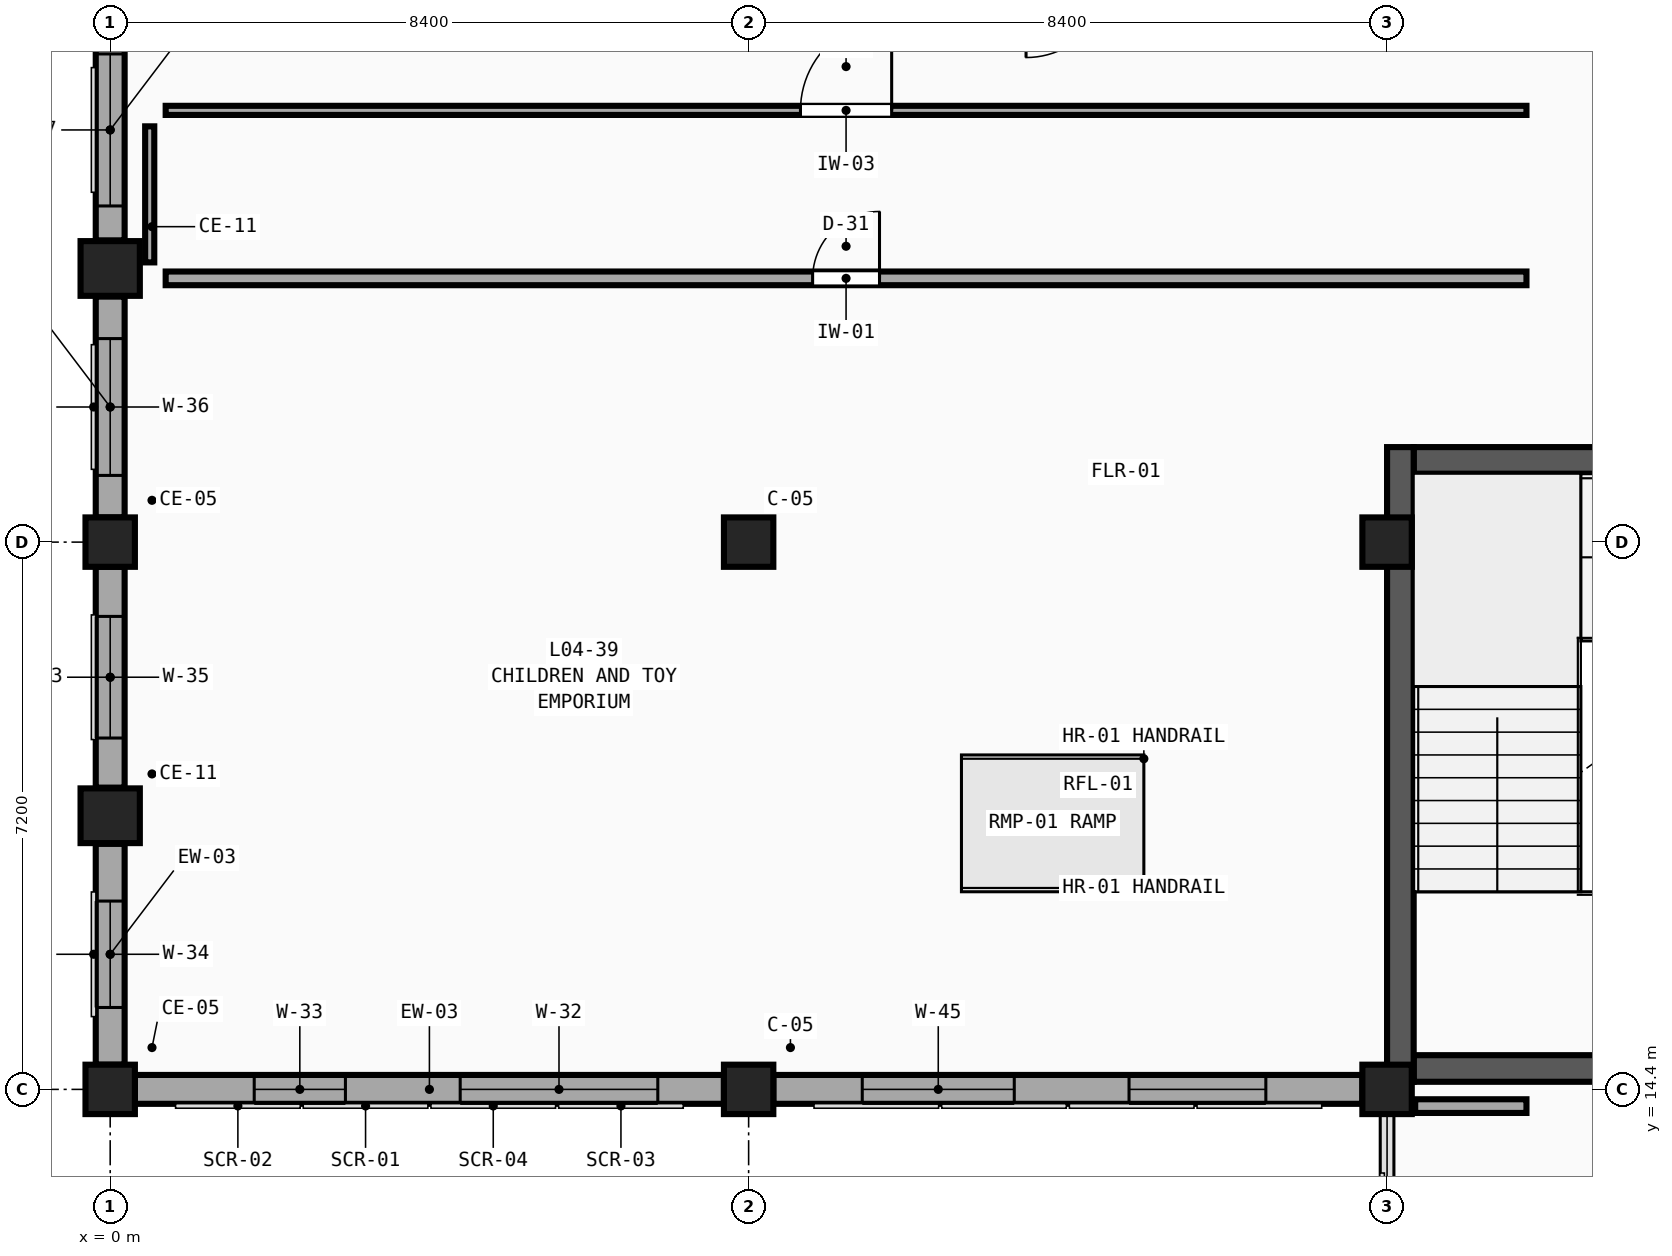
"""IFC4 building model, lengths in metres.
Left out: names, types, materials, properties, quantities, classifications, styles, units other than length and angle.
Written with IfcOpenShell. Run it as: python <this file> out.ifc"""

import sys

from ifc_helpers import new_model, si_unit, direction, frame, frame_2d, origin, origin_2d, place, context, subcontext, project, spatial, rectangle, extrude, element, fill, save


model = new_model("IFC4")
c1 = context("Model", 3, precision=1e-05, world=origin(), true_north=direction((0.0, 1.0)))
c2 = subcontext(c1, "Body", "Model", "MODEL_VIEW")
j1 = project(units=[si_unit("LENGTHUNIT", "METRE"), si_unit("PLANEANGLEUNIT", "RADIAN")], contexts=[c1])
p1 = place(None, origin())
s1 = spatial("IfcSite", under=j1, at=p1, CompositionType="ELEMENT")
p2 = place(p1, origin())
s2 = spatial("IfcBuilding", under=s1, at=p2, CompositionType="ELEMENT")
p3 = place(p2, frame((0.0, 0.0, 18.9)))
s3 = spatial("IfcBuildingStorey", under=s2, at=p3, CompositionType="ELEMENT", Elevation=18.9)
for number, where, z_axis, x_axis in (
    (1, (0.0, 14.4, 0.0), (0.0, 0.0, 1.0), (1.0, 0.0, 0.0)),
    (2, (0.0, 21.6, 0.0), (0.0, 0.0, 1.0), (1.0, 0.0, 0.0)),
    (3, (8.4, 14.4, 0.0), (0.0, 0.0, 1.0), (1.0, 0.0, 0.0)),
    (4, (8.4, 21.6, 0.0), (0.0, 0.0, 1.0), (1.0, 0.0, 0.0)),
    (5, (16.8, 14.4, 0.0), (0.0, 0.0, 1.0), (1.0, 0.0, 0.0)),
    (6, (16.8, 21.6, 0.0), (0.0, 0.0, 1.0), (1.0, 0.0, 0.0)),
):
    element("IfcColumn", number, at=place(p3, frame(where, z_axis=z_axis, x_axis=x_axis)), inside=s3, PredefinedType="COLUMN", context=c2, shape_type="SweptSolid", body=[
        extrude(rectangle(XDim=0.65, YDim=0.65, at=origin_2d()), origin(), (0.0, 0.0, 1.0), 4.5),
    ])
for number, where, z_axis, x_axis in (
    (7, (0.0, 18.0, 0.0), (0.0, 0.0, 1.0), (1.0, 0.0, 0.0)),
    (8, (0.0, 25.2, 0.0), (0.0, 0.0, 1.0), (1.0, 0.0, 0.0)),
):
    element("IfcColumn", number, at=place(p3, frame(where, z_axis=z_axis, x_axis=x_axis)), inside=s3, PredefinedType="PILASTER", context=c2, shape_type="SweptSolid", body=[
        extrude(rectangle(XDim=0.78, YDim=0.72, at=origin_2d()), origin(), (0.0, 0.0, 1.0), 4.5),
    ])
p4 = place(p3, frame((8.075, 14.4, 0.0), z_axis=(0.0, 0.0, 1.0), x_axis=(-1.0, 0.0, 0.0)))
e9 = element("IfcWall", 9, at=p4, inside=s3, PredefinedType="SOLIDWALL", context=c2, shape_type="SweptSolid", body=[
    extrude(rectangle(XDim=7.75, YDim=0.38, at=frame_2d((3.875, 0.0))), origin(), (0.0, 0.0, 1.0), 3.63),
])
p5 = place(p4, frame((0.87, 0.0, 0.75)))
e10 = element("IfcOpeningElement", 10, at=p5, cuts=e9, PredefinedType="OPENING", context=c2, shape_type="SweptSolid", body=[
    extrude(rectangle(XDim=2.6, YDim=2.44, at=frame_2d((1.3, 1.22))), frame((0.0, 0.21, 0.0), z_axis=(0.0, -1.0, 0.0), x_axis=(1.0, 0.0, 0.0)), (0.0, 0.0, 1.0), 0.42),
])
p6 = place(p4, frame((4.98, 0.0, 0.75)))
e11 = element("IfcOpeningElement", 11, at=p6, cuts=e9, PredefinedType="OPENING", context=c2, shape_type="SweptSolid", body=[
    extrude(rectangle(XDim=1.2, YDim=2.62, at=frame_2d((0.6, 1.31))), frame((0.0, 0.21, 0.0), z_axis=(0.0, -1.0, 0.0), x_axis=(1.0, 0.0, 0.0)), (0.0, 0.0, 1.0), 0.42),
])
p7 = place(p3, frame((0.0, 14.725, 0.0), z_axis=(0.0, 0.0, 1.0), x_axis=(0.0, 1.0, 0.0)))
e12 = element("IfcWall", 12, at=p7, inside=s3, PredefinedType="SOLIDWALL", context=c2, shape_type="SweptSolid", body=[
    extrude(rectangle(XDim=2.905, YDim=0.38, at=frame_2d((1.452, 0.0))), origin(), (0.0, 0.0, 1.0), 3.63),
])
p8 = place(p7, frame((0.752, 0.0, 0.75)))
e13 = element("IfcOpeningElement", 13, at=p8, cuts=e12, PredefinedType="OPENING", context=c2, shape_type="SweptSolid", body=[
    extrude(rectangle(XDim=1.4, YDim=2.62, at=frame_2d((0.7, 1.31))), frame((0.0, 0.21, 0.0), z_axis=(0.0, -1.0, 0.0), x_axis=(1.0, 0.0, 0.0)), (0.0, 0.0, 1.0), 0.42),
])
p9 = place(p3, frame((0.0, 18.37, 0.0), z_axis=(0.0, 0.0, 1.0), x_axis=(0.0, 1.0, 0.0)))
e14 = element("IfcWall", 14, at=p9, inside=s3, PredefinedType="SOLIDWALL", context=c2, shape_type="SweptSolid", body=[
    extrude(rectangle(XDim=2.905, YDim=0.38, at=frame_2d((1.452, 0.0))), origin(), (0.0, 0.0, 1.0), 3.63),
])
p10 = place(p9, frame((0.653, 0.0, 0.75)))
e15 = element("IfcOpeningElement", 15, at=p10, cuts=e14, PredefinedType="OPENING", context=c2, shape_type="SweptSolid", body=[
    extrude(rectangle(XDim=1.6, YDim=2.62, at=frame_2d((0.8, 1.31))), frame((0.0, 0.21, 0.0), z_axis=(0.0, -1.0, 0.0), x_axis=(1.0, 0.0, 0.0)), (0.0, 0.0, 1.0), 0.42),
])
p11 = place(p3, frame((0.0, 21.925, 0.0), z_axis=(0.0, 0.0, 1.0), x_axis=(0.0, 1.0, 0.0)))
e16 = element("IfcWall", 16, at=p11, inside=s3, PredefinedType="SOLIDWALL", context=c2, shape_type="SweptSolid", body=[
    extrude(rectangle(XDim=2.905, YDim=0.38, at=frame_2d((1.453, 0.0))), origin(), (0.0, 0.0, 1.0), 3.63),
])
p12 = place(p11, frame((0.552, 0.0, 0.75)))
e17 = element("IfcOpeningElement", 17, at=p12, cuts=e16, PredefinedType="OPENING", context=c2, shape_type="SweptSolid", body=[
    extrude(rectangle(XDim=1.8, YDim=2.62, at=frame_2d((0.9, 1.31))), frame((0.0, 0.21, 0.0), z_axis=(0.0, -1.0, 0.0), x_axis=(1.0, 0.0, 0.0)), (0.0, 0.0, 1.0), 0.42),
])
p13 = place(p3, frame((0.0, 25.57, 0.0), z_axis=(0.0, 0.0, 1.0), x_axis=(0.0, 1.0, 0.0)))
e18 = element("IfcWall", 18, at=p13, inside=s3, PredefinedType="SOLIDWALL", context=c2, shape_type="SweptSolid", body=[
    extrude(rectangle(XDim=2.905, YDim=0.38, at=frame_2d((1.453, 0.0))), origin(), (0.0, 0.0, 1.0), 3.63),
])
p14 = place(p13, frame((0.452, 0.0, 0.75)))
e19 = element("IfcOpeningElement", 19, at=p14, cuts=e18, PredefinedType="OPENING", context=c2, shape_type="SweptSolid", body=[
    extrude(rectangle(XDim=2.0, YDim=2.62, at=frame_2d((1.0, 1.31))), frame((0.0, 0.21, 0.0), z_axis=(0.0, -1.0, 0.0), x_axis=(1.0, 0.0, 0.0)), (0.0, 0.0, 1.0), 0.42),
])
p15 = place(p3, frame((16.475, 14.4, 0.0), z_axis=(0.0, 0.0, 1.0), x_axis=(-1.0, 0.0, 0.0)))
e20 = element("IfcWall", 20, at=p15, inside=s3, PredefinedType="SOLIDWALL", context=c2, shape_type="SweptSolid", body=[
    extrude(rectangle(XDim=7.75, YDim=0.38, at=frame_2d((3.875, 0.0))), origin(), (0.0, 0.0, 1.0), 3.63),
])
p16 = place(p15, frame((1.27, 0.0, 0.75)))
e21 = element("IfcOpeningElement", 21, at=p16, cuts=e20, PredefinedType="OPENING", context=c2, shape_type="SweptSolid", body=[
    extrude(rectangle(XDim=1.8, YDim=2.73, at=frame_2d((0.9, 1.365))), frame((0.0, 0.21, 0.0), z_axis=(0.0, -1.0, 0.0), x_axis=(1.0, 0.0, 0.0)), (0.0, 0.0, 1.0), 0.42),
])
p17 = place(p15, frame((4.58, 0.0, 0.75)))
e22 = element("IfcOpeningElement", 22, at=p17, cuts=e20, PredefinedType="OPENING", context=c2, shape_type="SweptSolid", body=[
    extrude(rectangle(XDim=2.0, YDim=2.73, at=frame_2d((1.0, 1.365))), frame((0.0, 0.21, 0.0), z_axis=(0.0, -1.0, 0.0), x_axis=(1.0, 0.0, 0.0)), (0.0, 0.0, 1.0), 0.42),
])
p18 = place(p3, frame((24.85, 14.675, 0.0), z_axis=(0.0, 0.0, 1.0), x_axis=(-1.0, 0.0, 0.0)))
e23 = element("IfcWall", 23, at=p18, inside=s3, PredefinedType="SHEAR", context=c2, shape_type="SweptSolid", body=[
    extrude(rectangle(XDim=7.7, YDim=0.35, at=frame_2d((3.85, 0.0))), origin(), (0.0, 0.0, 1.0), 4.5),
])
p19 = place(p18, frame((3.3, 0.0, 0.0)))
e24 = element("IfcOpeningElement", 24, at=p19, cuts=e23, PredefinedType="OPENING", context=c2, shape_type="SweptSolid", body=[
    extrude(rectangle(XDim=1.1, YDim=2.2, at=frame_2d((0.55, 1.1))), frame((0.0, 0.195, 0.0), z_axis=(0.0, -1.0, 0.0), x_axis=(1.0, 0.0, 0.0)), (0.0, 0.0, 1.0), 0.39),
])
p20 = place(p3, frame((17.15, 22.675, 0.0), z_axis=(0.0, 0.0, 1.0), x_axis=(1.0, 0.0, 0.0)))
e25 = element("IfcWall", 25, at=p20, inside=s3, PredefinedType="SHEAR", context=c2, shape_type="SweptSolid", body=[
    extrude(rectangle(XDim=7.7, YDim=0.35, at=frame_2d((3.85, 0.0))), origin(), (0.0, 0.0, 1.0), 4.5),
])
p21 = place(p3, frame((16.975, 22.85, 0.0), z_axis=(0.0, 0.0, 1.0), x_axis=(0.0, -1.0, 0.0)))
e26 = element("IfcWall", 26, at=p21, inside=s3, PredefinedType="SHEAR", context=c2, shape_type="SweptSolid", body=[
    extrude(rectangle(XDim=8.35, YDim=0.35, at=frame_2d((4.175, 0.0))), origin(), (0.0, 0.0, 1.0), 4.5),
])
p22 = place(p3, frame((0.73, 25.07, 0.0), z_axis=(0.0, 0.0, 1.0), x_axis=(1.0, 0.0, 0.0)))
e27 = element("IfcWall", 27, at=p22, inside=s3, PredefinedType="PARTITIONING", context=c2, shape_type="SweptSolid", body=[
    extrude(rectangle(XDim=17.904, YDim=0.18, at=frame_2d((8.952, 0.0))), origin(), (0.0, 0.0, 1.0), 4.18),
])
p23 = place(p22, frame((8.512, 0.0, 0.0)))
e28 = element("IfcOpeningElement", 28, at=p23, cuts=e27, PredefinedType="OPENING", context=c2, shape_type="SweptSolid", body=[
    extrude(rectangle(XDim=0.88, YDim=2.45, at=frame_2d((0.44, 1.225))), frame((0.0, 0.11, 0.0), z_axis=(0.0, -1.0, 0.0), x_axis=(1.0, 0.0, 0.0)), (0.0, 0.0, 1.0), 0.22),
])
p24 = place(p3, frame((0.73, 27.28, 0.0), z_axis=(0.0, 0.0, 1.0), x_axis=(1.0, 0.0, 0.0)))
e29 = element("IfcWall", 29, at=p24, inside=s3, PredefinedType="PARTITIONING", context=c2, shape_type="SweptSolid", body=[
    extrude(rectangle(XDim=17.904, YDim=0.12, at=frame_2d((8.952, 0.0))), origin(), (0.0, 0.0, 1.0), 4.18),
])
p25 = place(p24, frame((8.352, 0.0, 0.0)))
e30 = element("IfcOpeningElement", 30, at=p25, cuts=e29, PredefinedType="OPENING", context=c2, shape_type="SweptSolid", body=[
    extrude(rectangle(XDim=1.2, YDim=2.45, at=frame_2d((0.6, 1.225))), frame((0.0, 0.08, 0.0), z_axis=(0.0, -1.0, 0.0), x_axis=(1.0, 0.0, 0.0)), (0.0, 0.0, 1.0), 0.16),
])
p26 = place(p3, frame((0.52, 25.28, 0.0), z_axis=(0.0, 0.0, 1.0), x_axis=(0.0, 1.0, 0.0)))
e31 = element("IfcWall", 31, at=p26, inside=s3, PredefinedType="PARTITIONING", context=c2, shape_type="SweptSolid", body=[
    extrude(rectangle(XDim=1.79, YDim=0.12, at=frame_2d((0.895, 0.0))), origin(), (0.0, 0.0, 1.0), 3.63),
])
p27 = place(p3, frame((17.17, 14.18, 0.0), z_axis=(0.0, 0.0, 1.0), x_axis=(1.0, 0.0, 0.0)))
e32 = element("IfcWall", 32, at=p27, inside=s3, PredefinedType="PARTITIONING", context=c2, shape_type="SweptSolid", body=[
    extrude(rectangle(XDim=1.464, YDim=0.18, at=frame_2d((0.732, 0.0))), origin(), (0.0, 0.0, 1.0), 3.73),
])
p28 = place(p5, origin())
e33 = element("IfcWindow", 33, at=p28, inside=s3, PartitioningType="TRIPLE_PANEL_VERTICAL", PredefinedType="WINDOW", context=c2, shape_type="SweptSolid", body=[
    extrude(rectangle(XDim=2.6, YDim=2.44, at=frame_2d((1.3, 1.22))), frame((0.0, 0.03, 0.0), z_axis=(0.0, -1.0, 0.0), x_axis=(1.0, 0.0, 0.0)), (0.0, 0.0, 1.0), 0.06),
])
fill(e10, e33)
p29 = place(p6, origin())
e34 = element("IfcWindow", 34, at=p29, inside=s3, PartitioningType="SINGLE_PANEL", PredefinedType="WINDOW", context=c2, shape_type="SweptSolid", body=[
    extrude(rectangle(XDim=1.2, YDim=2.62, at=frame_2d((0.6, 1.31))), frame((0.0, 0.03, 0.0), z_axis=(0.0, -1.0, 0.0), x_axis=(1.0, 0.0, 0.0)), (0.0, 0.0, 1.0), 0.06),
])
fill(e11, e34)
p30 = place(p8, origin())
e35 = element("IfcWindow", 35, at=p30, inside=s3, PartitioningType="DOUBLE_PANEL_VERTICAL", PredefinedType="WINDOW", context=c2, shape_type="SweptSolid", body=[
    extrude(rectangle(XDim=1.4, YDim=2.62, at=frame_2d((0.7, 1.31))), frame((0.0, 0.03, 0.0), z_axis=(0.0, -1.0, 0.0), x_axis=(1.0, 0.0, 0.0)), (0.0, 0.0, 1.0), 0.06),
])
fill(e13, e35)
p31 = place(p10, origin())
e36 = element("IfcWindow", 36, at=p31, inside=s3, PartitioningType="DOUBLE_PANEL_VERTICAL", PredefinedType="WINDOW", context=c2, shape_type="SweptSolid", body=[
    extrude(rectangle(XDim=1.6, YDim=2.62, at=frame_2d((0.8, 1.31))), frame((0.0, 0.03, 0.0), z_axis=(0.0, -1.0, 0.0), x_axis=(1.0, 0.0, 0.0)), (0.0, 0.0, 1.0), 0.06),
])
fill(e15, e36)
p32 = place(p12, origin())
e37 = element("IfcWindow", 37, at=p32, inside=s3, PartitioningType="DOUBLE_PANEL_VERTICAL", PredefinedType="WINDOW", context=c2, shape_type="SweptSolid", body=[
    extrude(rectangle(XDim=1.8, YDim=2.62, at=frame_2d((0.9, 1.31))), frame((0.0, 0.03, 0.0), z_axis=(0.0, -1.0, 0.0), x_axis=(1.0, 0.0, 0.0)), (0.0, 0.0, 1.0), 0.06),
])
fill(e17, e37)
p33 = place(p14, origin())
e38 = element("IfcWindow", 38, at=p33, inside=s3, PartitioningType="TRIPLE_PANEL_VERTICAL", PredefinedType="WINDOW", context=c2, shape_type="SweptSolid", body=[
    extrude(rectangle(XDim=2.0, YDim=2.62, at=frame_2d((1.0, 1.31))), frame((0.0, 0.03, 0.0), z_axis=(0.0, -1.0, 0.0), x_axis=(1.0, 0.0, 0.0)), (0.0, 0.0, 1.0), 0.06),
])
fill(e19, e38)
p34 = place(p16, origin())
e39 = element("IfcWindow", 39, at=p34, inside=s3, PartitioningType="DOUBLE_PANEL_VERTICAL", PredefinedType="WINDOW", context=c2, shape_type="SweptSolid", body=[
    extrude(rectangle(XDim=1.8, YDim=2.73, at=frame_2d((0.9, 1.365))), frame((0.0, 0.03, 0.0), z_axis=(0.0, -1.0, 0.0), x_axis=(1.0, 0.0, 0.0)), (0.0, 0.0, 1.0), 0.06),
])
fill(e21, e39)
p35 = place(p17, origin())
e40 = element("IfcWindow", 40, at=p35, inside=s3, PartitioningType="TRIPLE_PANEL_VERTICAL", PredefinedType="WINDOW", context=c2, shape_type="SweptSolid", body=[
    extrude(rectangle(XDim=2.0, YDim=2.73, at=frame_2d((1.0, 1.365))), frame((0.0, 0.03, 0.0), z_axis=(0.0, -1.0, 0.0), x_axis=(1.0, 0.0, 0.0)), (0.0, 0.0, 1.0), 0.06),
])
fill(e22, e40)
p36 = place(p23, origin())
e41 = element("IfcDoor", 41, at=p36, inside=s3, OperationType="SINGLE_SWING_RIGHT", PredefinedType="DOOR", context=c2, shape_type="SweptSolid", body=[
    extrude(rectangle(XDim=0.88, YDim=2.45, at=frame_2d((0.44, 1.225))), frame((0.0, 0.025, 0.0), z_axis=(0.0, -1.0, 0.0), x_axis=(1.0, 0.0, 0.0)), (0.0, 0.0, 1.0), 0.05),
])
fill(e28, e41)
p37 = place(p25, origin())
e42 = element("IfcDoor", 42, at=p37, inside=s3, OperationType="SINGLE_SWING_RIGHT", PredefinedType="DOOR", context=c2, shape_type="SweptSolid", body=[
    extrude(rectangle(XDim=1.2, YDim=2.45, at=frame_2d((0.6, 1.225))), frame((0.0, 0.025, 0.0), z_axis=(0.0, -1.0, 0.0), x_axis=(1.0, 0.0, 0.0)), (0.0, 0.0, 1.0), 0.05),
])
fill(e30, e42)
save(model, sys.argv[1])
